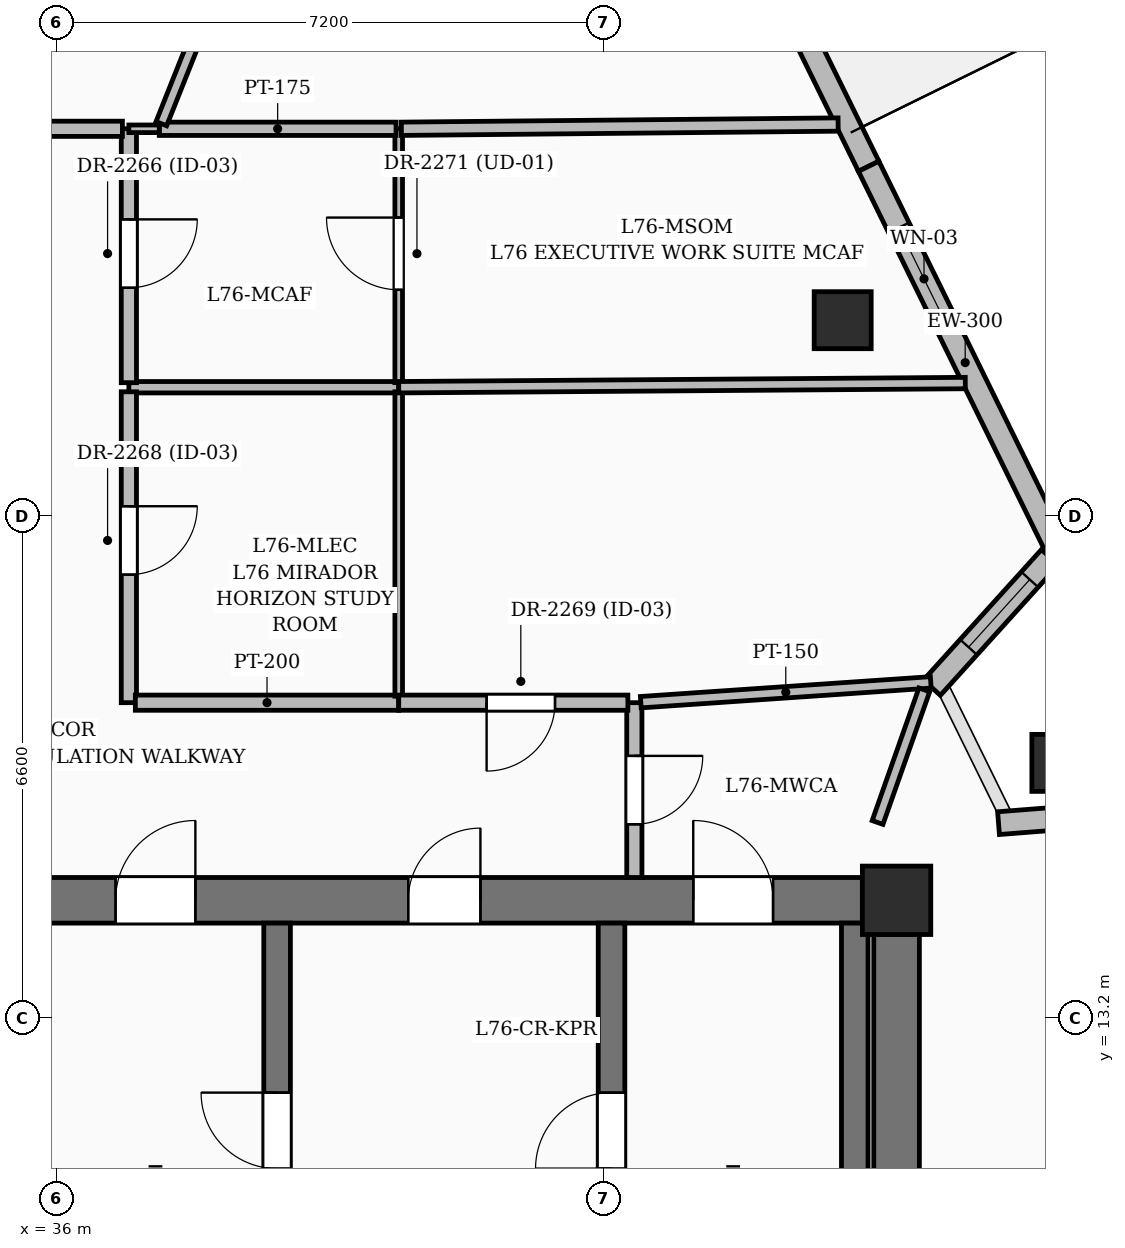
"""IFC4 building model, lengths in metres.
Left out: names, types, materials, properties, quantities, classifications, styles, units other than length and angle.
Written with IfcOpenShell. Run it as: python <this file> out.ifc"""

import sys

from ifc_helpers import new_model, si_unit, direction, frame, frame_2d, origin, origin_2d, place, context, subcontext, project, spatial, rectangle, extrude, element, fill, save


model = new_model("IFC4")
c1 = context("Model", 3, precision=1e-05, world=origin(), true_north=direction((0.0, 1.0)))
c2 = subcontext(c1, "Body", "Model", "MODEL_VIEW")
j1 = project(units=[si_unit("LENGTHUNIT", "METRE"), si_unit("PLANEANGLEUNIT", "RADIAN")], contexts=[c1])
p1 = place(None, origin())
s1 = spatial("IfcSite", under=j1, at=p1, CompositionType="ELEMENT")
p2 = place(p1, origin())
s2 = spatial("IfcBuilding", under=s1, at=p2, CompositionType="ELEMENT")
p3 = place(p2, frame((0.0, 0.0, 294.0)))
s3 = spatial("IfcBuildingStorey", under=s2, at=p3, CompositionType="ELEMENT", Elevation=294.0)
p4 = place(p3, frame((47.05, 14.75, 0.0), z_axis=(0.0, 0.0, 1.0), x_axis=(1.0, 0.0, 0.0)))
e1 = element("IfcColumn", 1, at=p4, inside=s3, PredefinedType="COLUMN", context=c2, shape_type="SweptSolid", body=[
    extrude(rectangle(XDim=0.9, YDim=0.9, at=origin_2d()), origin(), (0.0, 0.0, 1.0), 4.5),
])
p5 = place(p3, frame((35.6, 14.75, 0.0), z_axis=(0.0, 0.0, 1.0), x_axis=(1.0, 0.0, 0.0)))
e2 = element("IfcWall", 2, at=p5, inside=s3, PredefinedType="SHEAR", context=c2, shape_type="SweptSolid", body=[
    extrude(rectangle(XDim=11.0, YDim=0.6, at=frame_2d((5.5, 0.0))), origin(), (0.0, 0.0, 1.0), 4.5),
])
p6 = place(p5, frame((1.175, 0.0, 0.0)))
e3 = element("IfcOpeningElement", 3, at=p6, cuts=e2, PredefinedType="OPENING", context=c2, shape_type="SweptSolid", body=[
    extrude(rectangle(XDim=1.05, YDim=2.15, at=frame_2d((0.525, 1.075))), frame((0.0, 0.31, 0.0), z_axis=(0.0, -1.0, 0.0), x_axis=(1.0, 0.0, 0.0)), (0.0, 0.0, 1.0), 0.62),
])
p7 = place(p5, frame((8.775, 0.0, 0.0)))
e4 = element("IfcOpeningElement", 4, at=p7, cuts=e2, PredefinedType="OPENING", context=c2, shape_type="SweptSolid", body=[
    extrude(rectangle(XDim=1.05, YDim=2.15, at=frame_2d((0.525, 1.075))), frame((0.0, 0.31, 0.0), z_axis=(0.0, -1.0, 0.0), x_axis=(1.0, 0.0, 0.0)), (0.0, 0.0, 1.0), 0.62),
])
p8 = place(p5, frame((5.025, 0.0, 0.0)))
e5 = element("IfcOpeningElement", 5, at=p8, cuts=e2, PredefinedType="OPENING", context=c2, shape_type="SweptSolid", body=[
    extrude(rectangle(XDim=0.95, YDim=2.15, at=frame_2d((0.475, 1.075))), frame((0.0, 0.31, 0.0), z_axis=(0.0, -1.0, 0.0), x_axis=(1.0, 0.0, 0.0)), (0.0, 0.0, 1.0), 0.62),
])
p9 = place(p3, frame((47.05, 5.0, 0.0), z_axis=(0.0, 0.0, 1.0), x_axis=(0.0, 1.0, 0.0)))
e6 = element("IfcWall", 6, at=p9, inside=s3, PredefinedType="SHEAR", context=c2, shape_type="SweptSolid", body=[
    extrude(rectangle(XDim=9.3, YDim=0.6, at=frame_2d((4.65, 0.0))), origin(), (0.0, 0.0, 1.0), 4.5),
])
p10 = place(p3, frame((38.9, 5.2, 0.0), z_axis=(0.0, 0.0, 1.0), x_axis=(0.0, 1.0, 0.0)))
e7 = element("IfcWall", 7, at=p10, inside=s3, PredefinedType="SOLIDWALL", context=c2, shape_type="SweptSolid", body=[
    extrude(rectangle(XDim=9.25, YDim=0.35, at=frame_2d((4.625, 0.0))), origin(), (0.0, 0.0, 1.0), 4.5),
])
p11 = place(p10, frame((6.02, 0.0, 0.0)))
e8 = element("IfcOpeningElement", 8, at=p11, cuts=e7, PredefinedType="OPENING", context=c2, shape_type="SweptSolid", body=[
    extrude(rectangle(XDim=1.0, YDim=2.15, at=frame_2d((0.5, 1.075))), frame((0.0, 0.185, 0.0), z_axis=(0.0, -1.0, 0.0), x_axis=(1.0, 0.0, 0.0)), (0.0, 0.0, 1.0), 0.37),
])
p12 = place(p3, frame((43.3, 5.2, 0.0), z_axis=(0.0, 0.0, 1.0), x_axis=(0.0, 1.0, 0.0)))
e9 = element("IfcWall", 9, at=p12, inside=s3, PredefinedType="SOLIDWALL", context=c2, shape_type="SweptSolid", body=[
    extrude(rectangle(XDim=9.25, YDim=0.35, at=frame_2d((4.625, 0.0))), origin(), (0.0, 0.0, 1.0), 4.5),
])
p13 = place(p12, frame((6.02, 0.0, 0.0)))
e10 = element("IfcOpeningElement", 10, at=p13, cuts=e9, PredefinedType="OPENING", context=c2, shape_type="SweptSolid", body=[
    extrude(rectangle(XDim=1.0, YDim=2.15, at=frame_2d((0.5, 1.075))), frame((0.0, 0.185, 0.0), z_axis=(0.0, -1.0, 0.0), x_axis=(1.0, 0.0, 0.0)), (0.0, 0.0, 1.0), 0.37),
])
p14 = place(p3, frame((46.5, 5.2, 0.0), z_axis=(0.0, 0.0, 1.0), x_axis=(0.0, 1.0, 0.0)))
e11 = element("IfcWall", 11, at=p14, inside=s3, PredefinedType="SOLIDWALL", context=c2, shape_type="SweptSolid", body=[
    extrude(rectangle(XDim=9.25, YDim=0.35, at=frame_2d((4.625, 0.0))), origin(), (0.0, 0.0, 1.0), 4.5),
])
for number, where, z_axis, x_axis in (
    (12, (49.205, 16.558, 0.0), (0.0, 0.0, 1.0), (1.0, 0.0, 0.0)),
    (13, (46.341, 22.382, 0.0), (0.0, 0.0, 1.0), (1.0, 0.0, 0.0)),
):
    element("IfcColumn", number, at=place(p3, frame(where, z_axis=z_axis, x_axis=x_axis)), inside=s3, PredefinedType="COLUMN", context=c2, shape_type="SweptSolid", body=[
        extrude(rectangle(XDim=0.75, YDim=0.75, at=origin_2d()), origin(), (0.0, 0.0, 1.0), 4.5),
    ])
p15 = place(p3, frame((44.143, 29.572, 0.0), z_axis=(0.0, 0.0, 1.0), x_axis=(0.441265341282, -0.897376675975, 0.0)))
e14 = element("IfcWall", 14, at=p15, inside=s3, PredefinedType="SOLIDWALL", context=c2, shape_type="SweptSolid", body=[
    extrude(rectangle(XDim=5.756, YDim=0.3, at=frame_2d((2.878, 0.0))), origin(), (0.0, 0.0, 1.0), 4.2),
])
p16 = place(p15, frame((2.07, 0.0, 0.0)))
e15 = element("IfcOpeningElement", 15, at=p16, cuts=e14, PredefinedType="OPENING", context=c2, shape_type="SweptSolid", body=[
    extrude(rectangle(XDim=1.0, YDim=2.2, at=frame_2d((0.5, 1.1))), frame((0.0, 0.16, 0.0), z_axis=(0.0, -1.0, 0.0), x_axis=(1.0, 0.0, 0.0)), (0.0, 0.0, 1.0), 0.32),
])
p17 = place(p3, frame((46.683, 24.406, 0.0), z_axis=(0.0, 0.0, 1.0), x_axis=(0.441299498192, -0.897359879254, 0.0)))
e16 = element("IfcWall", 16, at=p17, inside=s3, PredefinedType="SOLIDWALL", context=c2, shape_type="SweptSolid", body=[
    extrude(rectangle(XDim=5.756, YDim=0.3, at=frame_2d((2.878, 0.0))), origin(), (0.0, 0.0, 1.0), 4.2),
])
p18 = place(p17, frame((0.9, 0.0, 0.6)))
e17 = element("IfcOpeningElement", 17, at=p18, cuts=e16, PredefinedType="OPENING", context=c2, shape_type="SweptSolid", body=[
    extrude(rectangle(XDim=1.5, YDim=2.1, at=frame_2d((0.75, 1.05))), frame((0.0, 0.16, 0.0), z_axis=(0.0, -1.0, 0.0), x_axis=(1.0, 0.0, 0.0)), (0.0, 0.0, 1.0), 0.32),
])
p19 = place(p3, frame((49.067, 19.263, 0.0), z_axis=(0.0, 0.0, 1.0), x_axis=(-0.670764114694, -0.741670750697, 0.0)))
e18 = element("IfcWall", 18, at=p19, inside=s3, PredefinedType="SOLIDWALL", context=c2, shape_type="SweptSolid", body=[
    extrude(rectangle(XDim=2.314, YDim=0.3, at=frame_2d((1.157, 0.0))), origin(), (0.0, 0.0, 1.0), 3.482),
])
p20 = place(p19, frame((0.395, 0.0, 0.8)))
e19 = element("IfcOpeningElement", 19, at=p20, cuts=e18, PredefinedType="OPENING", context=c2, shape_type="SweptSolid", body=[
    extrude(rectangle(XDim=1.2, YDim=1.8, at=frame_2d((0.6, 0.9))), frame((0.0, 0.16, 0.0), z_axis=(0.0, -1.0, 0.0), x_axis=(1.0, 0.0, 0.0)), (0.0, 0.0, 1.0), 0.32),
])
p21 = place(p3, frame((48.391, 15.765, 0.0), z_axis=(0.0, 0.0, 1.0), x_axis=(0.996929740899, 0.078301288061, 0.0)))
e20 = element("IfcWall", 20, at=p21, inside=s3, PredefinedType="SOLIDWALL", context=c2, shape_type="SweptSolid", body=[
    extrude(rectangle(XDim=2.594, YDim=0.3, at=frame_2d((1.297, 0.0))), origin(), (0.0, 0.0, 1.0), 3.482),
])
p22 = place(p21, frame((0.675, 0.0, 0.8)))
e21 = element("IfcOpeningElement", 21, at=p22, cuts=e20, PredefinedType="OPENING", context=c2, shape_type="SweptSolid", body=[
    extrude(rectangle(XDim=1.2, YDim=1.8, at=frame_2d((0.6, 0.9))), frame((0.0, 0.16, 0.0), z_axis=(0.0, -1.0, 0.0), x_axis=(1.0, 0.0, 0.0)), (0.0, 0.0, 1.0), 0.32),
])
p23 = place(p3, frame((43.6, 17.35, 0.0), z_axis=(0.0, 0.0, 1.0), x_axis=(0.0, -1.0, 0.0)))
e22 = element("IfcWall", 22, at=p23, inside=s3, PredefinedType="PARTITIONING", context=c2, shape_type="SweptSolid", body=[
    extrude(rectangle(XDim=2.3, YDim=0.2, at=frame_2d((1.15, 0.0))), origin(), (0.0, 0.0, 1.0), 3.559),
])
p24 = place(p23, frame((0.7, 0.0, 0.0)))
e23 = element("IfcOpeningElement", 23, at=p24, cuts=e22, PredefinedType="OPENING", context=c2, shape_type="SweptSolid", body=[
    extrude(rectangle(XDim=0.9, YDim=2.1, at=frame_2d((0.45, 1.05))), frame((0.0, 0.11, 0.0), z_axis=(0.0, -1.0, 0.0), x_axis=(1.0, 0.0, 0.0)), (0.0, 0.0, 1.0), 0.22),
])
p25 = place(p3, frame((47.5, 17.617, 0.0), z_axis=(0.0, 0.0, 1.0), x_axis=(-0.997677090315, -0.0681206537, 0.0)))
e24 = element("IfcWall", 24, at=p25, inside=s3, PredefinedType="PARTITIONING", context=c2, shape_type="SweptSolid", body=[
    extrude(rectangle(XDim=3.824, YDim=0.15, at=frame_2d((1.912, 0.0))), origin(), (0.0, 0.0, 1.0), 3.535),
])
p26 = place(p3, frame((36.95, 21.5, 0.0), z_axis=(0.0, 0.0, 1.0), x_axis=(1.0, 0.0, 0.0)))
e25 = element("IfcWall", 25, at=p26, inside=s3, PredefinedType="PARTITIONING", context=c2, shape_type="SweptSolid", body=[
    extrude(rectangle(XDim=3.55, YDim=0.15, at=frame_2d((1.775, 0.0))), origin(), (0.0, 0.0, 1.0), 3.535),
])
p27 = place(p3, frame((40.5, 21.56, 0.0), z_axis=(0.0, 0.0, 1.0), x_axis=(0.0, 1.0, 0.0)))
e26 = element("IfcWall", 26, at=p27, inside=s3, PredefinedType="PARTITIONING", context=c2, shape_type="SweptSolid", body=[
    extrude(rectangle(XDim=3.34, YDim=0.1, at=frame_2d((1.67, 0.0))), origin(), (0.0, 0.0, 1.0), 3.535),
])
p28 = place(p27, frame((1.222, 0.0, 0.0)))
e27 = element("IfcOpeningElement", 27, at=p28, cuts=e26, PredefinedType="OPENING", context=c2, shape_type="SweptSolid", body=[
    extrude(rectangle(XDim=0.95, YDim=2.2, at=frame_2d((0.475, 1.1))), frame((0.0, 0.06, 0.0), z_axis=(0.0, -1.0, 0.0), x_axis=(1.0, 0.0, 0.0)), (0.0, 0.0, 1.0), 0.12),
])
p29 = place(p3, frame((40.465, 24.9, 0.0), z_axis=(0.0, 0.0, 1.0), x_axis=(-1.0, 0.0, 0.0)))
e28 = element("IfcWall", 28, at=p29, inside=s3, PredefinedType="PARTITIONING", context=c2, shape_type="SweptSolid", body=[
    extrude(rectangle(XDim=3.115, YDim=0.175, at=frame_2d((1.558, 0.0))), origin(), (0.0, 0.0, 1.0), 3.535),
])
p30 = place(p3, frame((36.95, 24.9, 0.0), z_axis=(0.0, 0.0, 1.0), x_axis=(0.0, -1.0, 0.0)))
e29 = element("IfcWall", 29, at=p30, inside=s3, PredefinedType="PARTITIONING", context=c2, shape_type="SweptSolid", body=[
    extrude(rectangle(XDim=3.34, YDim=0.2, at=frame_2d((1.67, 0.0))), origin(), (0.0, 0.0, 1.0), 3.559),
])
p31 = place(p30, frame((1.192, 0.0, 0.0)))
e30 = element("IfcOpeningElement", 30, at=p31, cuts=e29, PredefinedType="OPENING", context=c2, shape_type="SweptSolid", body=[
    extrude(rectangle(XDim=0.9, YDim=2.1, at=frame_2d((0.45, 1.05))), frame((0.0, 0.11, 0.0), z_axis=(0.0, -1.0, 0.0), x_axis=(1.0, 0.0, 0.0)), (0.0, 0.0, 1.0), 0.22),
])
p32 = place(p3, frame((37.35, 24.9, 0.0), z_axis=(0.0, 0.0, 1.0), x_axis=(-1.0, 0.0, 0.0)))
e31 = element("IfcWall", 31, at=p32, inside=s3, PredefinedType="PARTITIONING", context=c2, shape_type="SweptSolid", body=[
    extrude(rectangle(XDim=0.4, YDim=0.1, at=frame_2d((0.2, 0.0))), origin(), (0.0, 0.0, 1.0), 4.2),
])
p33 = place(p3, frame((36.95, 21.44, 0.0), z_axis=(0.0, 0.0, 1.0), x_axis=(0.0, -1.0, 0.0)))
e32 = element("IfcWall", 32, at=p33, inside=s3, PredefinedType="PARTITIONING", context=c2, shape_type="SweptSolid", body=[
    extrude(rectangle(XDim=4.09, YDim=0.2, at=frame_2d((2.045, 0.0))), origin(), (0.0, 0.0, 1.0), 3.535),
])
p34 = place(p33, frame((1.506, 0.0, 0.0)))
e33 = element("IfcOpeningElement", 33, at=p34, cuts=e32, PredefinedType="OPENING", context=c2, shape_type="SweptSolid", body=[
    extrude(rectangle(XDim=0.9, YDim=2.1, at=frame_2d((0.45, 1.05))), frame((0.0, 0.11, 0.0), z_axis=(0.0, -1.0, 0.0), x_axis=(1.0, 0.0, 0.0)), (0.0, 0.0, 1.0), 0.22),
])
p35 = place(p3, frame((37.035, 17.35, 0.0), z_axis=(0.0, 0.0, 1.0), x_axis=(1.0, 0.0, 0.0)))
e34 = element("IfcWall", 34, at=p35, inside=s3, PredefinedType="PARTITIONING", context=c2, shape_type="SweptSolid", body=[
    extrude(rectangle(XDim=3.465, YDim=0.2, at=frame_2d((1.732, 0.0))), origin(), (0.0, 0.0, 1.0), 4.2),
])
p36 = place(p3, frame((40.5, 17.435, 0.0), z_axis=(0.0, 0.0, 1.0), x_axis=(0.0, 1.0, 0.0)))
e35 = element("IfcWall", 35, at=p36, inside=s3, PredefinedType="PARTITIONING", context=c2, shape_type="SweptSolid", body=[
    extrude(rectangle(XDim=4.005, YDim=0.1, at=frame_2d((2.002, 0.0))), origin(), (0.0, 0.0, 1.0), 3.559),
])
p37 = place(p3, frame((46.281, 24.956, 0.0), z_axis=(0.0, 0.0, 1.0), x_axis=(-0.999952669093, -0.009729315144, 0.0)))
e36 = element("IfcWall", 36, at=p37, inside=s3, PredefinedType="PARTITIONING", context=c2, shape_type="SweptSolid", body=[
    extrude(rectangle(XDim=5.746, YDim=0.175, at=frame_2d((2.873, 0.0))), origin(), (0.0, 0.0, 1.0), 3.477),
])
p38 = place(p3, frame((40.5, 21.5, 0.0), z_axis=(0.0, 0.0, 1.0), x_axis=(0.999972847686, 0.007369117343, 0.0)))
e37 = element("IfcWall", 37, at=p38, inside=s3, PredefinedType="PARTITIONING", context=c2, shape_type="SweptSolid", body=[
    extrude(rectangle(XDim=7.454, YDim=0.15, at=frame_2d((3.727, 0.0))), origin(), (0.0, 0.0, 1.0), 3.477),
])
p39 = place(p3, frame((40.718, 33.357, 0.0), z_axis=(0.0, 0.0, 1.0), x_axis=(-0.369977886049, -0.92904056092, 0.0)))
e38 = element("IfcWall", 38, at=p39, inside=s3, PredefinedType="PARTITIONING", context=c2, shape_type="SweptSolid", body=[
    extrude(rectangle(XDim=9.031, YDim=0.15, at=frame_2d((4.515, 0.0))), origin(), (0.0, 0.0, 1.0), 3.477),
])
p40 = place(p3, frame((36.865, 24.9, 0.0), z_axis=(0.0, 0.0, 1.0), x_axis=(-1.0, 0.0, 0.0)))
e39 = element("IfcWall", 39, at=p40, inside=s3, PredefinedType="PARTITIONING", context=c2, shape_type="SweptSolid", body=[
    extrude(rectangle(XDim=2.215, YDim=0.2, at=frame_2d((1.107, 0.0))), origin(), (0.0, 0.0, 1.0), 3.535),
])
p41 = place(p3, frame((43.515, 17.35, 0.0), z_axis=(0.0, 0.0, 1.0), x_axis=(-1.0, 0.0, 0.0)))
e40 = element("IfcWall", 40, at=p41, inside=s3, PredefinedType="PARTITIONING", context=c2, shape_type="SweptSolid", body=[
    extrude(rectangle(XDim=3.015, YDim=0.2, at=frame_2d((1.507, 0.0))), origin(), (0.0, 0.0, 1.0), 3.559),
])
p42 = place(p41, frame((0.958, 0.0, 0.0)))
e41 = element("IfcOpeningElement", 41, at=p42, cuts=e40, PredefinedType="OPENING", context=c2, shape_type="SweptSolid", body=[
    extrude(rectangle(XDim=0.9, YDim=2.1, at=frame_2d((0.45, 1.05))), frame((0.0, 0.11, 0.0), z_axis=(0.0, -1.0, 0.0), x_axis=(1.0, 0.0, 0.0)), (0.0, 0.0, 1.0), 0.22),
])
p43 = place(p3, frame((46.8, 15.774, 0.0), z_axis=(0.0, 0.0, 1.0), x_axis=(0.33237146436, 0.943148561828, 0.0)))
e42 = element("IfcWall", 42, at=p43, inside=s3, PredefinedType="PARTITIONING", context=c2, shape_type="SweptSolid", body=[
    extrude(rectangle(XDim=1.85, YDim=0.15, at=frame_2d((0.925, 0.0))), origin(), (0.0, 0.0, 1.0), 3.535),
])
p44 = place(p18, origin())
e43 = element("IfcWindow", 43, at=p44, inside=s3, PartitioningType="SINGLE_PANEL", PredefinedType="WINDOW", context=c2, shape_type="SweptSolid", body=[
    extrude(rectangle(XDim=1.5, YDim=2.1, at=frame_2d((0.75, 1.05))), frame((0.0, 0.03, 0.0), z_axis=(0.0, -1.0, 0.0), x_axis=(1.0, 0.0, 0.0)), (0.0, 0.0, 1.0), 0.06),
])
fill(e17, e43)
p45 = place(p20, origin())
e44 = element("IfcWindow", 44, at=p45, inside=s3, PartitioningType="SINGLE_PANEL", PredefinedType="WINDOW", context=c2, shape_type="SweptSolid", body=[
    extrude(rectangle(XDim=1.2, YDim=1.8, at=frame_2d((0.6, 0.9))), frame((0.0, 0.03, 0.0), z_axis=(0.0, -1.0, 0.0), x_axis=(1.0, 0.0, 0.0)), (0.0, 0.0, 1.0), 0.06),
])
fill(e19, e44)
p46 = place(p6, origin())
e45 = element("IfcDoor", 45, at=p46, inside=s3, OperationType="SINGLE_SWING_RIGHT", PredefinedType="DOOR", context=c2, shape_type="SweptSolid", body=[
    extrude(rectangle(XDim=1.05, YDim=2.15, at=frame_2d((0.525, 1.075))), frame((0.0, 0.025, 0.0), z_axis=(0.0, -1.0, 0.0), x_axis=(1.0, 0.0, 0.0)), (0.0, 0.0, 1.0), 0.05),
])
fill(e3, e45)
p47 = place(p7, origin())
e46 = element("IfcDoor", 46, at=p47, inside=s3, OperationType="SINGLE_SWING_LEFT", PredefinedType="DOOR", context=c2, shape_type="SweptSolid", body=[
    extrude(rectangle(XDim=1.05, YDim=2.15, at=frame_2d((0.525, 1.075))), frame((0.0, 0.025, 0.0), z_axis=(0.0, -1.0, 0.0), x_axis=(1.0, 0.0, 0.0)), (0.0, 0.0, 1.0), 0.05),
])
fill(e4, e46)
p48 = place(p11, origin())
e47 = element("IfcDoor", 47, at=p48, inside=s3, OperationType="SINGLE_SWING_RIGHT", PredefinedType="DOOR", context=c2, shape_type="SweptSolid", body=[
    extrude(rectangle(XDim=1.0, YDim=2.15, at=frame_2d((0.5, 1.075))), frame((0.0, 0.025, 0.0), z_axis=(0.0, -1.0, 0.0), x_axis=(1.0, 0.0, 0.0)), (0.0, 0.0, 1.0), 0.05),
])
fill(e8, e47)
p49 = place(p13, origin())
e48 = element("IfcDoor", 48, at=p49, inside=s3, OperationType="SINGLE_SWING_LEFT", PredefinedType="DOOR", context=c2, shape_type="SweptSolid", body=[
    extrude(rectangle(XDim=1.0, YDim=2.15, at=frame_2d((0.5, 1.075))), frame((0.0, 0.025, 0.0), z_axis=(0.0, -1.0, 0.0), x_axis=(1.0, 0.0, 0.0)), (0.0, 0.0, 1.0), 0.05),
])
fill(e10, e48)
p50 = place(p8, origin())
e49 = element("IfcDoor", 49, at=p50, inside=s3, OperationType="SINGLE_SWING_RIGHT", PredefinedType="DOOR", context=c2, shape_type="SweptSolid", body=[
    extrude(rectangle(XDim=0.95, YDim=2.15, at=frame_2d((0.475, 1.075))), frame((0.0, 0.025, 0.0), z_axis=(0.0, -1.0, 0.0), x_axis=(1.0, 0.0, 0.0)), (0.0, 0.0, 1.0), 0.05),
])
fill(e5, e49)
p51 = place(p31, origin())
e50 = element("IfcDoor", 50, at=p51, inside=s3, OperationType="SINGLE_SWING_LEFT", PredefinedType="DOOR", context=c2, shape_type="SweptSolid", body=[
    extrude(rectangle(XDim=0.9, YDim=2.1, at=frame_2d((0.45, 1.05))), frame((0.0, 0.025, 0.0), z_axis=(0.0, -1.0, 0.0), x_axis=(1.0, 0.0, 0.0)), (0.0, 0.0, 1.0), 0.05),
])
fill(e30, e50)
p52 = place(p34, origin())
e51 = element("IfcDoor", 51, at=p52, inside=s3, OperationType="SINGLE_SWING_LEFT", PredefinedType="DOOR", context=c2, shape_type="SweptSolid", body=[
    extrude(rectangle(XDim=0.9, YDim=2.1, at=frame_2d((0.45, 1.05))), frame((0.0, 0.025, 0.0), z_axis=(0.0, -1.0, 0.0), x_axis=(1.0, 0.0, 0.0)), (0.0, 0.0, 1.0), 0.05),
])
fill(e33, e51)
p53 = place(p42, origin())
e52 = element("IfcDoor", 52, at=p53, inside=s3, OperationType="SINGLE_SWING_RIGHT", PredefinedType="DOOR", context=c2, shape_type="SweptSolid", body=[
    extrude(rectangle(XDim=0.9, YDim=2.1, at=frame_2d((0.45, 1.05))), frame((0.0, 0.025, 0.0), z_axis=(0.0, -1.0, 0.0), x_axis=(1.0, 0.0, 0.0)), (0.0, 0.0, 1.0), 0.05),
])
fill(e41, e52)
p54 = place(p24, origin())
e53 = element("IfcDoor", 53, at=p54, inside=s3, OperationType="SINGLE_SWING_LEFT", PredefinedType="DOOR", context=c2, shape_type="SweptSolid", body=[
    extrude(rectangle(XDim=0.9, YDim=2.1, at=frame_2d((0.45, 1.05))), frame((0.0, 0.025, 0.0), z_axis=(0.0, -1.0, 0.0), x_axis=(1.0, 0.0, 0.0)), (0.0, 0.0, 1.0), 0.05),
])
fill(e23, e53)
p55 = place(p28, origin())
e54 = element("IfcDoor", 54, at=p55, inside=s3, OperationType="SINGLE_SWING_RIGHT", PredefinedType="DOOR", context=c2, shape_type="SweptSolid", body=[
    extrude(rectangle(XDim=0.95, YDim=2.2, at=frame_2d((0.475, 1.1))), frame((0.0, 0.025, 0.0), z_axis=(0.0, -1.0, 0.0), x_axis=(1.0, 0.0, 0.0)), (0.0, 0.0, 1.0), 0.05),
])
fill(e27, e54)
save(model, sys.argv[1])
